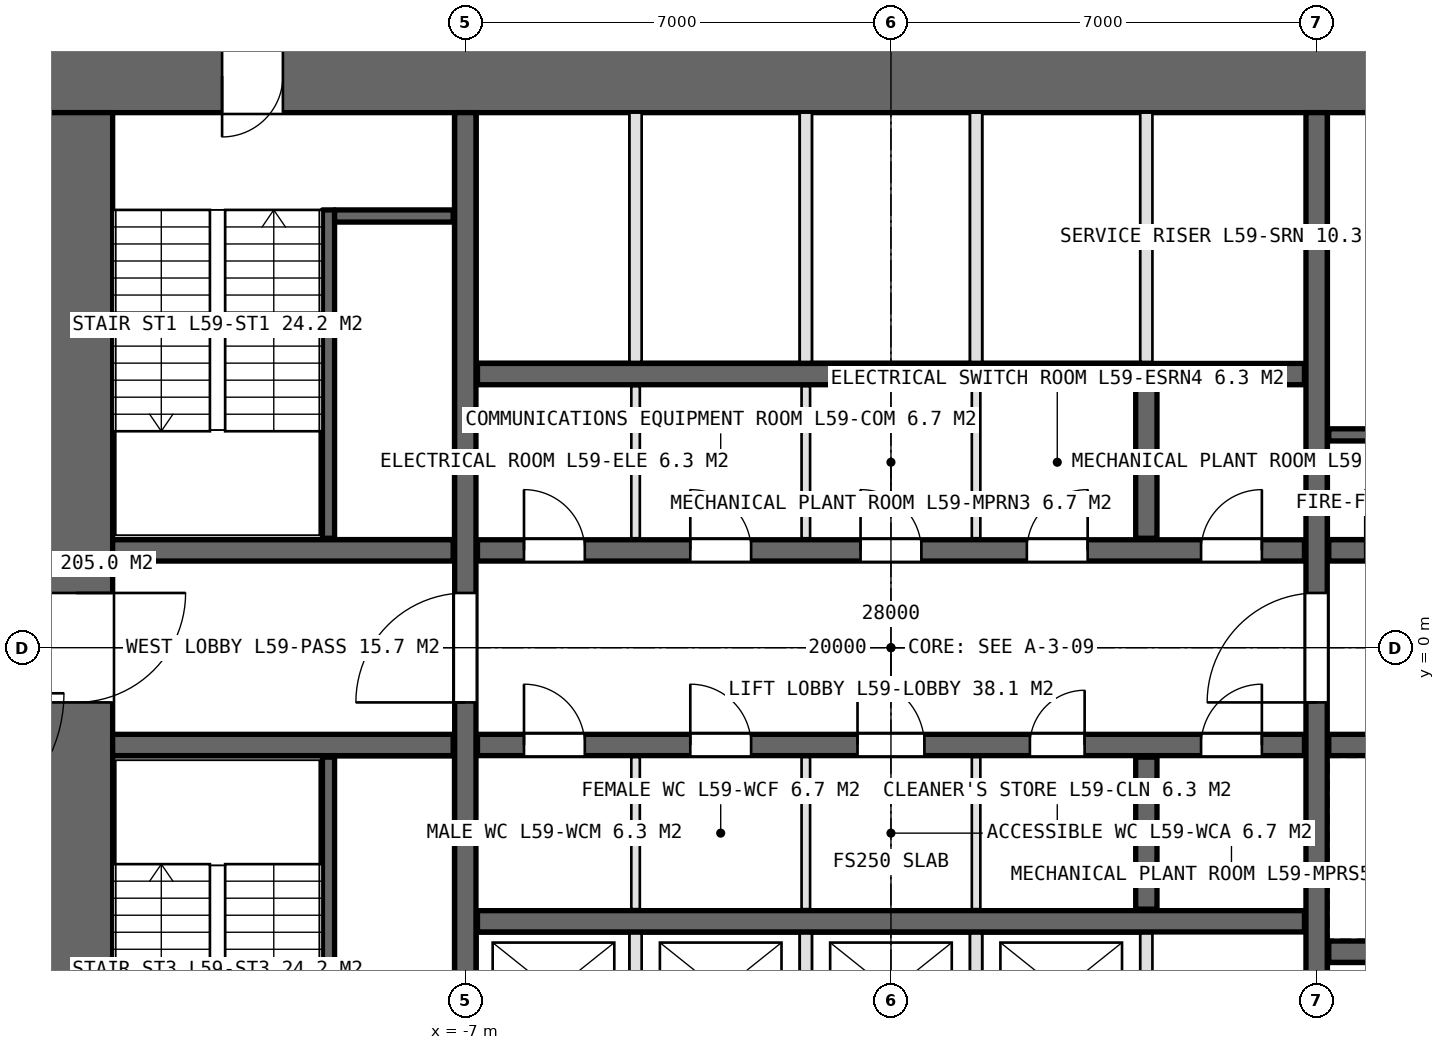
"""IFC4 building model, lengths in metres.
Left out: names, types, materials, properties, quantities, classifications, styles, units other than length and angle.
Written with IfcOpenShell. Run it as: python <this file> out.ifc"""

import sys

from ifc_helpers import new_model, si_unit, direction, frame, frame_2d, origin, place, context, subcontext, project, spatial, rectangle, extrude, element, fill, save


model = new_model("IFC4")
c1 = context("Model", 3, precision=1e-05, world=origin(), true_north=direction((0.0, 1.0)))
c2 = subcontext(c1, "Body", "Model", "MODEL_VIEW")
j1 = project(units=[si_unit("LENGTHUNIT", "METRE"), si_unit("PLANEANGLEUNIT", "RADIAN")], contexts=[c1])
p1 = place(None, origin())
s1 = spatial("IfcSite", under=j1, at=p1, CompositionType="ELEMENT")
p2 = place(p1, origin())
s2 = spatial("IfcBuilding", under=s1, at=p2, CompositionType="ELEMENT")
p3 = place(p2, frame((0.0, 0.0, 266.2)))
s3 = spatial("IfcBuildingStorey", under=s2, at=p3, CompositionType="ELEMENT", Elevation=266.2)
p4 = place(p3, frame((14.0, 9.4, 0.0), z_axis=(0.0, 0.0, 1.0), x_axis=(-1.0, 0.0, 0.0)))
e1 = element("IfcWall", 1, at=p4, inside=s3, PredefinedType="SHEAR", context=c2, shape_type="SweptSolid", body=[
    extrude(rectangle(XDim=28.0, YDim=1.2, at=frame_2d((14.0, 0.0))), origin(), (0.0, 0.0, 1.0), 5.0),
])
p5 = place(p4, frame((24.0, 0.0, 0.0)))
e2 = element("IfcOpeningElement", 2, at=p5, cuts=e1, PredefinedType="OPENING", context=c2, shape_type="SweptSolid", body=[
    extrude(rectangle(XDim=1.0, YDim=2.4, at=frame_2d((0.5, 1.2))), frame((0.0, 0.61, 0.0), z_axis=(0.0, -1.0, 0.0), x_axis=(1.0, 0.0, 0.0)), (0.0, 0.0, 1.0), 1.22),
])
p6 = place(p3, frame((-13.4, 8.8, 0.0), z_axis=(0.0, 0.0, 1.0), x_axis=(0.0, -1.0, 0.0)))
e3 = element("IfcWall", 3, at=p6, inside=s3, PredefinedType="SHEAR", context=c2, shape_type="SweptSolid", body=[
    extrude(rectangle(XDim=17.6, YDim=1.2, at=frame_2d((8.8, 0.0))), origin(), (0.0, 0.0, 1.0), 5.0),
])
p7 = place(p6, frame((7.9, 0.0, 0.0)))
e4 = element("IfcOpeningElement", 4, at=p7, cuts=e3, PredefinedType="OPENING", context=c2, shape_type="SweptSolid", body=[
    extrude(rectangle(XDim=1.8, YDim=2.4, at=frame_2d((0.9, 1.2))), frame((0.0, 0.61, 0.0), z_axis=(0.0, -1.0, 0.0), x_axis=(1.0, 0.0, 0.0)), (0.0, 0.0, 1.0), 1.22),
])
p8 = place(p6, frame((16.5, 0.0, 0.0)))
e5 = element("IfcOpeningElement", 5, at=p8, cuts=e3, PredefinedType="OPENING", context=c2, shape_type="SweptSolid", body=[
    extrude(rectangle(XDim=1.0, YDim=2.4, at=frame_2d((0.5, 1.2))), frame((0.0, 0.61, 0.0), z_axis=(0.0, -1.0, 0.0), x_axis=(1.0, 0.0, 0.0)), (0.0, 0.0, 1.0), 1.22),
])
p9 = place(p3, frame((-7.0, -8.8, 0.0), z_axis=(0.0, 0.0, 1.0), x_axis=(0.0, 1.0, 0.0)))
e6 = element("IfcWall", 6, at=p9, inside=s3, PredefinedType="SHEAR", context=c2, shape_type="SweptSolid", body=[
    extrude(rectangle(XDim=17.6, YDim=0.35, at=frame_2d((8.8, 0.0))), origin(), (0.0, 0.0, 1.0), 5.0),
])
p10 = place(p9, frame((7.9, 0.0, 0.0)))
e7 = element("IfcOpeningElement", 7, at=p10, cuts=e6, PredefinedType="OPENING", context=c2, shape_type="SweptSolid", body=[
    extrude(rectangle(XDim=1.8, YDim=2.4, at=frame_2d((0.9, 1.2))), frame((0.0, 0.185, 0.0), z_axis=(0.0, -1.0, 0.0), x_axis=(1.0, 0.0, 0.0)), (0.0, 0.0, 1.0), 0.37),
])
p11 = place(p3, frame((7.0, -8.8, 0.0), z_axis=(0.0, 0.0, 1.0), x_axis=(0.0, 1.0, 0.0)))
e8 = element("IfcWall", 8, at=p11, inside=s3, PredefinedType="SHEAR", context=c2, shape_type="SweptSolid", body=[
    extrude(rectangle(XDim=17.6, YDim=0.35, at=frame_2d((8.8, 0.0))), origin(), (0.0, 0.0, 1.0), 5.0),
])
p12 = place(p11, frame((7.9, 0.0, 0.0)))
e9 = element("IfcOpeningElement", 9, at=p12, cuts=e8, PredefinedType="OPENING", context=c2, shape_type="SweptSolid", body=[
    extrude(rectangle(XDim=1.8, YDim=2.4, at=frame_2d((0.9, 1.2))), frame((0.0, 0.185, 0.0), z_axis=(0.0, -1.0, 0.0), x_axis=(1.0, 0.0, 0.0)), (0.0, 0.0, 1.0), 0.37),
])
p13 = place(p3, frame((-6.8, 1.6, 0.0), z_axis=(0.0, 0.0, 1.0), x_axis=(1.0, 0.0, 0.0)))
e10 = element("IfcWall", 10, at=p13, inside=s3, PredefinedType="SHEAR", context=c2, shape_type="SweptSolid", body=[
    extrude(rectangle(XDim=13.6, YDim=0.35, at=frame_2d((6.8, 0.0))), origin(), (0.0, 0.0, 1.0), 5.0),
])
p14 = place(p13, frame((0.765, 0.0, 0.0)))
e11 = element("IfcOpeningElement", 11, at=p14, cuts=e10, PredefinedType="OPENING", context=c2, shape_type="SweptSolid", body=[
    extrude(rectangle(XDim=1.0, YDim=2.4, at=frame_2d((0.5, 1.2))), frame((0.0, 0.185, 0.0), z_axis=(0.0, -1.0, 0.0), x_axis=(1.0, 0.0, 0.0)), (0.0, 0.0, 1.0), 0.37),
])
p15 = place(p13, frame((3.5, 0.0, 0.0)))
e12 = element("IfcOpeningElement", 12, at=p15, cuts=e10, PredefinedType="OPENING", context=c2, shape_type="SweptSolid", body=[
    extrude(rectangle(XDim=1.0, YDim=2.4, at=frame_2d((0.5, 1.2))), frame((0.0, 0.185, 0.0), z_axis=(0.0, -1.0, 0.0), x_axis=(1.0, 0.0, 0.0)), (0.0, 0.0, 1.0), 0.37),
])
p16 = place(p13, frame((6.3, 0.0, 0.0)))
e13 = element("IfcOpeningElement", 13, at=p16, cuts=e10, PredefinedType="OPENING", context=c2, shape_type="SweptSolid", body=[
    extrude(rectangle(XDim=1.0, YDim=2.4, at=frame_2d((0.5, 1.2))), frame((0.0, 0.185, 0.0), z_axis=(0.0, -1.0, 0.0), x_axis=(1.0, 0.0, 0.0)), (0.0, 0.0, 1.0), 0.37),
])
p17 = place(p13, frame((9.035, 0.0, 0.0)))
e14 = element("IfcOpeningElement", 14, at=p17, cuts=e10, PredefinedType="OPENING", context=c2, shape_type="SweptSolid", body=[
    extrude(rectangle(XDim=1.0, YDim=2.4, at=frame_2d((0.5, 1.2))), frame((0.0, 0.185, 0.0), z_axis=(0.0, -1.0, 0.0), x_axis=(1.0, 0.0, 0.0)), (0.0, 0.0, 1.0), 0.37),
])
p18 = place(p13, frame((11.9, 0.0, 0.0)))
e15 = element("IfcOpeningElement", 15, at=p18, cuts=e10, PredefinedType="OPENING", context=c2, shape_type="SweptSolid", body=[
    extrude(rectangle(XDim=1.0, YDim=2.4, at=frame_2d((0.5, 1.2))), frame((0.0, 0.185, 0.0), z_axis=(0.0, -1.0, 0.0), x_axis=(1.0, 0.0, 0.0)), (0.0, 0.0, 1.0), 0.37),
])
p19 = place(p3, frame((-6.8, -1.6, 0.0), z_axis=(0.0, 0.0, 1.0), x_axis=(1.0, 0.0, 0.0)))
e16 = element("IfcWall", 16, at=p19, inside=s3, PredefinedType="SHEAR", context=c2, shape_type="SweptSolid", body=[
    extrude(rectangle(XDim=13.6, YDim=0.35, at=frame_2d((6.8, 0.0))), origin(), (0.0, 0.0, 1.0), 5.0),
])
p20 = place(p19, frame((0.765, 0.0, 0.0)))
e17 = element("IfcOpeningElement", 17, at=p20, cuts=e16, PredefinedType="OPENING", context=c2, shape_type="SweptSolid", body=[
    extrude(rectangle(XDim=1.0, YDim=2.4, at=frame_2d((0.5, 1.2))), frame((0.0, 0.185, 0.0), z_axis=(0.0, -1.0, 0.0), x_axis=(1.0, 0.0, 0.0)), (0.0, 0.0, 1.0), 0.37),
])
p21 = place(p19, frame((3.5, 0.0, 0.0)))
e18 = element("IfcOpeningElement", 18, at=p21, cuts=e16, PredefinedType="OPENING", context=c2, shape_type="SweptSolid", body=[
    extrude(rectangle(XDim=1.0, YDim=2.4, at=frame_2d((0.5, 1.2))), frame((0.0, 0.185, 0.0), z_axis=(0.0, -1.0, 0.0), x_axis=(1.0, 0.0, 0.0)), (0.0, 0.0, 1.0), 0.37),
])
p22 = place(p19, frame((6.25, 0.0, 0.0)))
e19 = element("IfcOpeningElement", 19, at=p22, cuts=e16, PredefinedType="OPENING", context=c2, shape_type="SweptSolid", body=[
    extrude(rectangle(XDim=1.1, YDim=2.4, at=frame_2d((0.55, 1.2))), frame((0.0, 0.185, 0.0), z_axis=(0.0, -1.0, 0.0), x_axis=(1.0, 0.0, 0.0)), (0.0, 0.0, 1.0), 0.37),
])
p23 = place(p19, frame((9.085, 0.0, 0.0)))
e20 = element("IfcOpeningElement", 20, at=p23, cuts=e16, PredefinedType="OPENING", context=c2, shape_type="SweptSolid", body=[
    extrude(rectangle(XDim=0.9, YDim=2.4, at=frame_2d((0.45, 1.2))), frame((0.0, 0.185, 0.0), z_axis=(0.0, -1.0, 0.0), x_axis=(1.0, 0.0, 0.0)), (0.0, 0.0, 1.0), 0.37),
])
p24 = place(p19, frame((11.9, 0.0, 0.0)))
e21 = element("IfcOpeningElement", 21, at=p24, cuts=e16, PredefinedType="OPENING", context=c2, shape_type="SweptSolid", body=[
    extrude(rectangle(XDim=1.0, YDim=2.4, at=frame_2d((0.5, 1.2))), frame((0.0, 0.185, 0.0), z_axis=(0.0, -1.0, 0.0), x_axis=(1.0, 0.0, 0.0)), (0.0, 0.0, 1.0), 0.37),
])
for number, where, z_axis, x_axis in (
    (22, (-6.8, 4.5, 0.0), (0.0, 0.0, 1.0), (1.0, 0.0, 0.0)),
    (23, (-6.8, -4.5, 0.0), (0.0, 0.0, 1.0), (1.0, 0.0, 0.0)),
):
    element("IfcWall", number, at=place(p3, frame(where, z_axis=z_axis, x_axis=x_axis)), inside=s3, PredefinedType="SHEAR", context=c2, shape_type="SweptSolid", body=[
        extrude(rectangle(XDim=13.6, YDim=0.35, at=frame_2d((6.8, 0.0))), origin(), (0.0, 0.0, 1.0), 5.0),
    ])
for number, where, z_axis, x_axis in (
    (24, (-12.8, 1.6, 0.0), (0.0, 0.0, 1.0), (1.0, 0.0, 0.0)),
    (25, (-12.8, -1.6, 0.0), (0.0, 0.0, 1.0), (1.0, 0.0, 0.0)),
):
    element("IfcWall", number, at=place(p3, frame(where, z_axis=z_axis, x_axis=x_axis)), inside=s3, PredefinedType="SHEAR", context=c2, shape_type="SweptSolid", body=[
        extrude(rectangle(XDim=5.6, YDim=0.35, at=frame_2d((2.8, 0.0))), origin(), (0.0, 0.0, 1.0), 5.0),
    ])
p25 = place(p3, frame((7.2, 1.6, 0.0), z_axis=(0.0, 0.0, 1.0), x_axis=(1.0, 0.0, 0.0)))
e26 = element("IfcWall", 26, at=p25, inside=s3, PredefinedType="SHEAR", context=c2, shape_type="SweptSolid", body=[
    extrude(rectangle(XDim=5.6, YDim=0.35, at=frame_2d((2.8, 0.0))), origin(), (0.0, 0.0, 1.0), 5.0),
])
p26 = place(p25, frame((0.6, 0.0, 0.0)))
e27 = element("IfcOpeningElement", 27, at=p26, cuts=e26, PredefinedType="OPENING", context=c2, shape_type="SweptSolid", body=[
    extrude(rectangle(XDim=1.0, YDim=2.4, at=frame_2d((0.5, 1.2))), frame((0.0, 0.185, 0.0), z_axis=(0.0, -1.0, 0.0), x_axis=(1.0, 0.0, 0.0)), (0.0, 0.0, 1.0), 0.37),
])
p27 = place(p3, frame((7.2, -1.6, 0.0), z_axis=(0.0, 0.0, 1.0), x_axis=(1.0, 0.0, 0.0)))
e28 = element("IfcWall", 28, at=p27, inside=s3, PredefinedType="SHEAR", context=c2, shape_type="SweptSolid", body=[
    extrude(rectangle(XDim=5.6, YDim=0.35, at=frame_2d((2.8, 0.0))), origin(), (0.0, 0.0, 1.0), 5.0),
])
p28 = place(p27, frame((0.9, 0.0, 0.0)))
e29 = element("IfcOpeningElement", 29, at=p28, cuts=e28, PredefinedType="OPENING", context=c2, shape_type="SweptSolid", body=[
    extrude(rectangle(XDim=1.3, YDim=2.4, at=frame_2d((0.65, 1.2))), frame((0.0, 0.185, 0.0), z_axis=(0.0, -1.0, 0.0), x_axis=(1.0, 0.0, 0.0)), (0.0, 0.0, 1.0), 0.37),
])
p29 = place(p27, frame((3.9, 0.0, 0.0)))
e30 = element("IfcOpeningElement", 30, at=p29, cuts=e28, PredefinedType="OPENING", context=c2, shape_type="SweptSolid", body=[
    extrude(rectangle(XDim=1.3, YDim=2.4, at=frame_2d((0.65, 1.2))), frame((0.0, 0.185, 0.0), z_axis=(0.0, -1.0, 0.0), x_axis=(1.0, 0.0, 0.0)), (0.0, 0.0, 1.0), 0.37),
])
p30 = place(p3, frame((7.2, -5.0, 0.0), z_axis=(0.0, 0.0, 1.0), x_axis=(1.0, 0.0, 0.0)))
e31 = element("IfcWall", 31, at=p30, inside=s3, PredefinedType="SHEAR", context=c2, shape_type="SweptSolid", body=[
    extrude(rectangle(XDim=5.6, YDim=0.35, at=frame_2d((2.8, 0.0))), origin(), (0.0, 0.0, 1.0), 5.0),
])
for number, where, z_axis, x_axis in (
    (32, (4.2, 1.8, 0.0), (0.0, 0.0, 1.0), (0.0, 1.0, 0.0)),
    (33, (4.2, -4.3, 0.0), (0.0, 0.0, 1.0), (0.0, 1.0, 0.0)),
):
    element("IfcWall", number, at=place(p3, frame(where, z_axis=z_axis, x_axis=x_axis)), inside=s3, PredefinedType="SHEAR", context=c2, shape_type="SweptSolid", body=[
        extrude(rectangle(XDim=2.5, YDim=0.35, at=frame_2d((1.25, 0.0))), origin(), (0.0, 0.0, 1.0), 5.0),
    ])
for number, where, z_axis, x_axis in (
    (34, (-4.2, 1.8, 0.0), (0.0, 0.0, 1.0), (0.0, 1.0, 0.0)),
    (35, (-1.4, 1.8, 0.0), (0.0, 0.0, 1.0), (0.0, 1.0, 0.0)),
    (36, (1.4, 1.8, 0.0), (0.0, 0.0, 1.0), (0.0, 1.0, 0.0)),
    (37, (-4.2, -1.8, 0.0), (0.0, 0.0, 1.0), (0.0, -1.0, 0.0)),
    (38, (-1.4, -1.8, 0.0), (0.0, 0.0, 1.0), (0.0, -1.0, 0.0)),
    (39, (1.4, -1.8, 0.0), (0.0, 0.0, 1.0), (0.0, -1.0, 0.0)),
):
    element("IfcWall", number, at=place(p3, frame(where, z_axis=z_axis, x_axis=x_axis)), inside=s3, PredefinedType="PARTITIONING", context=c2, shape_type="SweptSolid", body=[
        extrude(rectangle(XDim=2.5, YDim=0.14, at=frame_2d((1.25, 0.0))), origin(), (0.0, 0.0, 1.0), 4.75),
    ])
for number, where, z_axis, x_axis in (
    (40, (-4.2, 4.7, 0.0), (0.0, 0.0, 1.0), (0.0, 1.0, 0.0)),
    (41, (-1.4, 4.7, 0.0), (0.0, 0.0, 1.0), (0.0, 1.0, 0.0)),
    (42, (1.4, 4.7, 0.0), (0.0, 0.0, 1.0), (0.0, 1.0, 0.0)),
    (43, (4.2, 4.7, 0.0), (0.0, 0.0, 1.0), (0.0, 1.0, 0.0)),
    (44, (-4.2, -4.7, 0.0), (0.0, 0.0, 1.0), (0.0, -1.0, 0.0)),
    (45, (-1.4, -4.7, 0.0), (0.0, 0.0, 1.0), (0.0, -1.0, 0.0)),
    (46, (1.4, -4.7, 0.0), (0.0, 0.0, 1.0), (0.0, -1.0, 0.0)),
    (47, (4.2, -4.7, 0.0), (0.0, 0.0, 1.0), (0.0, -1.0, 0.0)),
):
    element("IfcWall", number, at=place(p3, frame(where, z_axis=z_axis, x_axis=x_axis)), inside=s3, PredefinedType="PARTITIONING", context=c2, shape_type="SweptSolid", body=[
        extrude(rectangle(XDim=4.1, YDim=0.2, at=frame_2d((2.05, 0.0))), origin(), (0.0, 0.0, 1.0), 5.0),
    ])
p31 = place(p3, frame((-9.25, 7.2, 0.0), z_axis=(0.0, 0.0, 1.0), x_axis=(0.0, -1.0, 0.0)))
e48 = element("IfcWall", 48, at=p31, inside=s3, PredefinedType="SOLIDWALL", context=c2, shape_type="SweptSolid", body=[
    extrude(rectangle(XDim=5.4, YDim=0.2, at=frame_2d((2.7, 0.0))), origin(), (0.0, 0.0, 1.0), 5.0),
])
p32 = place(p3, frame((-9.15, 7.1, 0.0), z_axis=(0.0, 0.0, 1.0), x_axis=(1.0, 0.0, 0.0)))
e49 = element("IfcWall", 49, at=p32, inside=s3, PredefinedType="SOLIDWALL", context=c2, shape_type="SweptSolid", body=[
    extrude(rectangle(XDim=1.95, YDim=0.2, at=frame_2d((0.975, 0.0))), origin(), (0.0, 0.0, 1.0), 5.0),
])
p33 = place(p3, frame((-9.25, -7.2, 0.0), z_axis=(0.0, 0.0, 1.0), x_axis=(0.0, 1.0, 0.0)))
e50 = element("IfcWall", 50, at=p33, inside=s3, PredefinedType="SOLIDWALL", context=c2, shape_type="SweptSolid", body=[
    extrude(rectangle(XDim=5.4, YDim=0.2, at=frame_2d((2.7, 0.0))), origin(), (0.0, 0.0, 1.0), 5.0),
])
p34 = place(p3, frame((9.15, 3.5, 0.0), z_axis=(0.0, 0.0, 1.0), x_axis=(-1.0, 0.0, 0.0)))
e51 = element("IfcWall", 51, at=p34, inside=s3, PredefinedType="SOLIDWALL", context=c2, shape_type="SweptSolid", body=[
    extrude(rectangle(XDim=1.95, YDim=0.2, at=frame_2d((0.975, 0.0))), origin(), (0.0, 0.0, 1.0), 5.0),
])
p35 = place(p7, origin())
e52 = element("IfcDoor", 52, at=p35, inside=s3, OperationType="DOUBLE_DOOR_SINGLE_SWING", PredefinedType="DOOR", context=c2, shape_type="SweptSolid", body=[
    extrude(rectangle(XDim=1.8, YDim=2.4, at=frame_2d((0.9, 1.2))), frame((0.0, 0.025, 0.0), z_axis=(0.0, -1.0, 0.0), x_axis=(1.0, 0.0, 0.0)), (0.0, 0.0, 1.0), 0.05),
])
fill(e4, e52)
p36 = place(p10, origin())
e53 = element("IfcDoor", 53, at=p36, inside=s3, OperationType="DOUBLE_DOOR_SINGLE_SWING", PredefinedType="DOOR", context=c2, shape_type="SweptSolid", body=[
    extrude(rectangle(XDim=1.8, YDim=2.4, at=frame_2d((0.9, 1.2))), frame((0.0, 0.025, 0.0), z_axis=(0.0, -1.0, 0.0), x_axis=(1.0, 0.0, 0.0)), (0.0, 0.0, 1.0), 0.05),
])
fill(e7, e53)
p37 = place(p12, origin())
e54 = element("IfcDoor", 54, at=p37, inside=s3, OperationType="DOUBLE_DOOR_SINGLE_SWING", PredefinedType="DOOR", context=c2, shape_type="SweptSolid", body=[
    extrude(rectangle(XDim=1.8, YDim=2.4, at=frame_2d((0.9, 1.2))), frame((0.0, 0.025, 0.0), z_axis=(0.0, -1.0, 0.0), x_axis=(1.0, 0.0, 0.0)), (0.0, 0.0, 1.0), 0.05),
])
fill(e9, e54)
p38 = place(p5, origin())
e55 = element("IfcDoor", 55, at=p38, inside=s3, OperationType="SINGLE_SWING_RIGHT", PredefinedType="DOOR", context=c2, shape_type="SweptSolid", body=[
    extrude(rectangle(XDim=1.0, YDim=2.4, at=frame_2d((0.5, 1.2))), frame((0.0, 0.025, 0.0), z_axis=(0.0, -1.0, 0.0), x_axis=(1.0, 0.0, 0.0)), (0.0, 0.0, 1.0), 0.05),
])
fill(e2, e55)
p39 = place(p20, origin())
e56 = element("IfcDoor", 56, at=p39, inside=s3, OperationType="SINGLE_SWING_LEFT", PredefinedType="DOOR", context=c2, shape_type="SweptSolid", body=[
    extrude(rectangle(XDim=1.0, YDim=2.4, at=frame_2d((0.5, 1.2))), frame((0.0, 0.025, 0.0), z_axis=(0.0, -1.0, 0.0), x_axis=(1.0, 0.0, 0.0)), (0.0, 0.0, 1.0), 0.05),
])
fill(e17, e56)
p40 = place(p21, origin())
e57 = element("IfcDoor", 57, at=p40, inside=s3, OperationType="SINGLE_SWING_LEFT", PredefinedType="DOOR", context=c2, shape_type="SweptSolid", body=[
    extrude(rectangle(XDim=1.0, YDim=2.4, at=frame_2d((0.5, 1.2))), frame((0.0, 0.025, 0.0), z_axis=(0.0, -1.0, 0.0), x_axis=(1.0, 0.0, 0.0)), (0.0, 0.0, 1.0), 0.05),
])
fill(e18, e57)
p41 = place(p22, origin())
e58 = element("IfcDoor", 58, at=p41, inside=s3, OperationType="SINGLE_SWING_LEFT", PredefinedType="DOOR", context=c2, shape_type="SweptSolid", body=[
    extrude(rectangle(XDim=1.1, YDim=2.4, at=frame_2d((0.55, 1.2))), frame((0.0, 0.025, 0.0), z_axis=(0.0, -1.0, 0.0), x_axis=(1.0, 0.0, 0.0)), (0.0, 0.0, 1.0), 0.05),
])
fill(e19, e58)
p42 = place(p23, origin())
e59 = element("IfcDoor", 59, at=p42, inside=s3, OperationType="SINGLE_SWING_RIGHT", PredefinedType="DOOR", context=c2, shape_type="SweptSolid", body=[
    extrude(rectangle(XDim=0.9, YDim=2.4, at=frame_2d((0.45, 1.2))), frame((0.0, 0.025, 0.0), z_axis=(0.0, -1.0, 0.0), x_axis=(1.0, 0.0, 0.0)), (0.0, 0.0, 1.0), 0.05),
])
fill(e20, e59)
p43 = place(p14, origin())
e60 = element("IfcDoor", 60, at=p43, inside=s3, OperationType="SINGLE_SWING_LEFT", PredefinedType="DOOR", context=c2, shape_type="SweptSolid", body=[
    extrude(rectangle(XDim=1.0, YDim=2.4, at=frame_2d((0.5, 1.2))), frame((0.0, 0.025, 0.0), z_axis=(0.0, -1.0, 0.0), x_axis=(1.0, 0.0, 0.0)), (0.0, 0.0, 1.0), 0.05),
])
fill(e11, e60)
p44 = place(p15, origin())
e61 = element("IfcDoor", 61, at=p44, inside=s3, OperationType="SINGLE_SWING_LEFT", PredefinedType="DOOR", context=c2, shape_type="SweptSolid", body=[
    extrude(rectangle(XDim=1.0, YDim=2.4, at=frame_2d((0.5, 1.2))), frame((0.0, 0.025, 0.0), z_axis=(0.0, -1.0, 0.0), x_axis=(1.0, 0.0, 0.0)), (0.0, 0.0, 1.0), 0.05),
])
fill(e12, e61)
p45 = place(p16, origin())
e62 = element("IfcDoor", 62, at=p45, inside=s3, OperationType="SINGLE_SWING_LEFT", PredefinedType="DOOR", context=c2, shape_type="SweptSolid", body=[
    extrude(rectangle(XDim=1.0, YDim=2.4, at=frame_2d((0.5, 1.2))), frame((0.0, 0.025, 0.0), z_axis=(0.0, -1.0, 0.0), x_axis=(1.0, 0.0, 0.0)), (0.0, 0.0, 1.0), 0.05),
])
fill(e13, e62)
p46 = place(p17, origin())
e63 = element("IfcDoor", 63, at=p46, inside=s3, OperationType="SINGLE_SWING_RIGHT", PredefinedType="DOOR", context=c2, shape_type="SweptSolid", body=[
    extrude(rectangle(XDim=1.0, YDim=2.4, at=frame_2d((0.5, 1.2))), frame((0.0, 0.025, 0.0), z_axis=(0.0, -1.0, 0.0), x_axis=(1.0, 0.0, 0.0)), (0.0, 0.0, 1.0), 0.05),
])
fill(e14, e63)
p47 = place(p18, origin())
e64 = element("IfcDoor", 64, at=p47, inside=s3, OperationType="SINGLE_SWING_RIGHT", PredefinedType="DOOR", context=c2, shape_type="SweptSolid", body=[
    extrude(rectangle(XDim=1.0, YDim=2.4, at=frame_2d((0.5, 1.2))), frame((0.0, 0.025, 0.0), z_axis=(0.0, -1.0, 0.0), x_axis=(1.0, 0.0, 0.0)), (0.0, 0.0, 1.0), 0.05),
])
fill(e15, e64)
p48 = place(p24, origin())
e65 = element("IfcDoor", 65, at=p48, inside=s3, OperationType="SINGLE_SWING_RIGHT", PredefinedType="DOOR", context=c2, shape_type="SweptSolid", body=[
    extrude(rectangle(XDim=1.0, YDim=2.4, at=frame_2d((0.5, 1.2))), frame((0.0, 0.025, 0.0), z_axis=(0.0, -1.0, 0.0), x_axis=(1.0, 0.0, 0.0)), (0.0, 0.0, 1.0), 0.05),
])
fill(e21, e65)
save(model, sys.argv[1])
